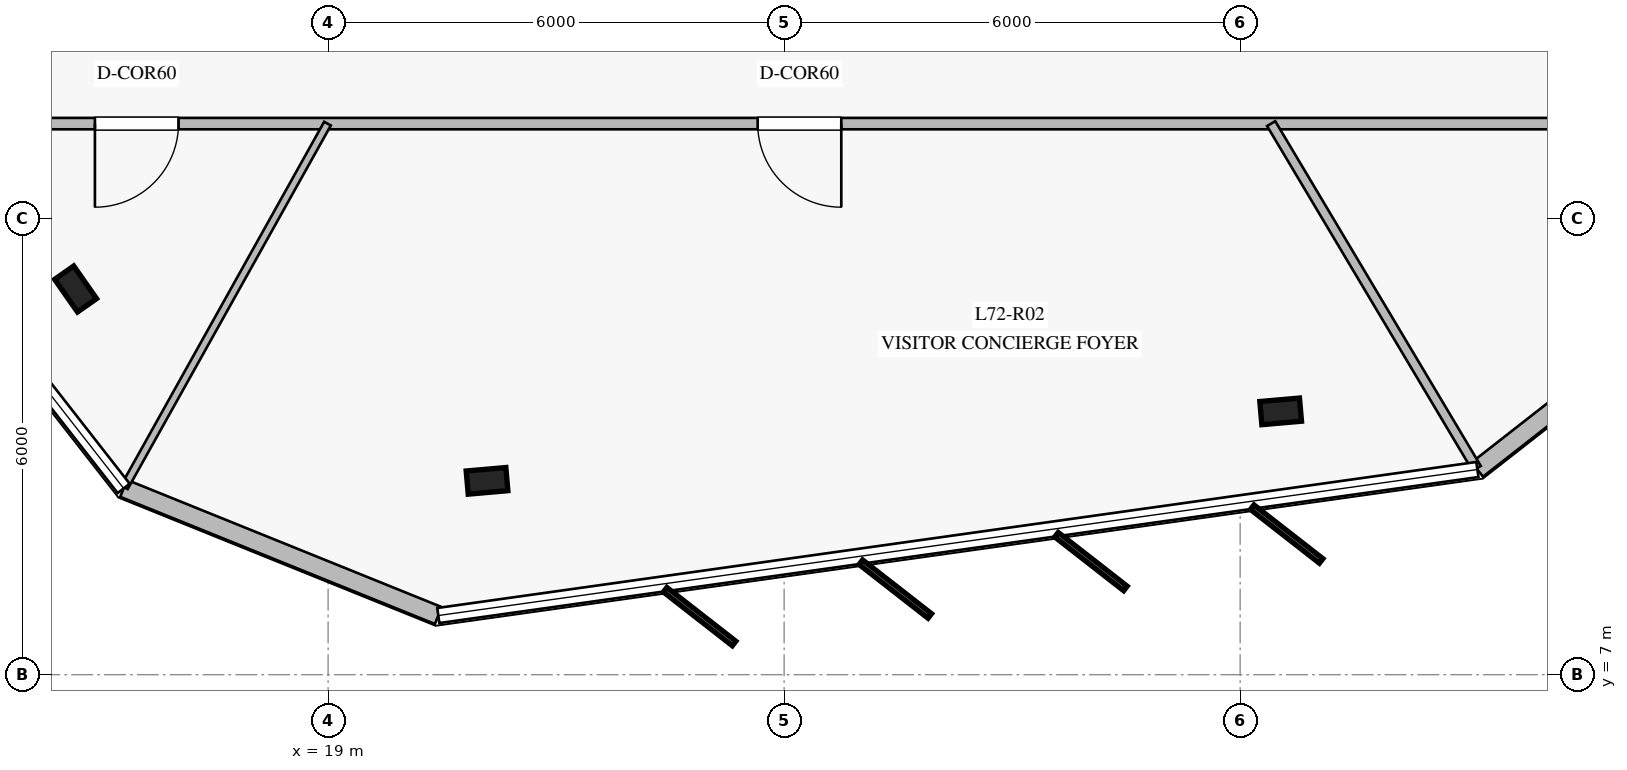
"""IFC4 building model, lengths in metres.
Left out: names, types, materials, properties, quantities, classifications, styles, units other than length and angle.
Written with IfcOpenShell. Run it as: python <this file> out.ifc"""

import sys

from ifc_helpers import new_model, si_unit, direction, frame, frame_2d, origin, origin_2d, place, context, subcontext, project, spatial, rectangle, i_section, extrude, element, fill, save


model = new_model("IFC4")
c1 = context("Model", 3, precision=1e-05, world=origin(), true_north=direction((0.0, 1.0)))
c2 = subcontext(c1, "Body", "Model", "MODEL_VIEW")
j1 = project(units=[si_unit("LENGTHUNIT", "METRE"), si_unit("PLANEANGLEUNIT", "RADIAN")], contexts=[c1])
p1 = place(None, origin())
s1 = spatial("IfcSite", under=j1, at=p1, CompositionType="ELEMENT")
p2 = place(p1, origin())
s2 = spatial("IfcBuilding", under=s1, at=p2, CompositionType="ELEMENT")
p3 = place(p2, frame((0.0, 0.0, 298.2)))
s3 = spatial("IfcBuildingStorey", under=s2, at=p3, CompositionType="ELEMENT", Elevation=298.2)
for number, where, z_axis, x_axis in (
    (1, (15.678, 12.074, 0.0), (0.0, 0.0, 1.0), (-0.574, 0.819, 0.0)),
    (2, (21.091, 9.55, 0.0), (0.0, 0.0, 1.0), (0.996, 0.087, 0.0)),
    (3, (31.533, 10.464, 0.0), (0.0, 0.0, 1.0), (0.996, 0.087, 0.0)),
):
    element("IfcColumn", number, at=place(p3, frame(where, z_axis=z_axis, x_axis=x_axis)), inside=s3, PredefinedType="COLUMN", context=c2, shape_type="SweptSolid", body=[
        extrude(i_section(OverallWidth=0.306, OverallDepth=0.524, WebThickness=0.021, FlangeThickness=0.04, at=origin_2d()), origin(), (0.0, 0.0, 1.0), 4.0),
    ])
p4 = place(p3, frame((16.31, 9.451, 0.0), z_axis=(0.0, 0.0, 1.0), x_axis=(0.927166243324, -0.374650179823, 0.0)))
e4 = element("IfcWall", 4, at=p4, inside=s3, PredefinedType="STANDARD", context=c2, shape_type="SweptSolid", body=[
    extrude(rectangle(XDim=4.465, YDim=0.24, at=frame_2d((2.232, 0.0))), origin(), (0.0, 0.0, 1.0), 3.78),
])
p5 = place(p3, frame((34.121, 9.699, 0.0), z_axis=(0.0, 0.0, 1.0), x_axis=(0.78792242083, 0.615774519408, 0.0)))
e5 = element("IfcWall", 5, at=p5, inside=s3, PredefinedType="STANDARD", context=c2, shape_type="SweptSolid", body=[
    extrude(rectangle(XDim=4.466, YDim=0.24, at=frame_2d((2.233, 0.0))), origin(), (0.0, 0.0, 1.0), 3.78),
])
p6 = place(p3, frame((36.35, 14.25, 0.0), z_axis=(0.0, 0.0, 1.0), x_axis=(-1.0, 0.0, 0.0)))
e6 = element("IfcWall", 6, at=p6, inside=s3, PredefinedType="PARTITIONING", context=c2, shape_type="SweptSolid", body=[
    extrude(rectangle(XDim=22.7, YDim=0.15, at=frame_2d((11.35, 0.0))), origin(), (0.0, 0.0, 1.0), 3.28),
])
p7 = place(p6, frame((19.318, 0.0, 0.0)))
e7 = element("IfcOpeningElement", 7, at=p7, cuts=e6, PredefinedType="OPENING", context=c2, shape_type="SweptSolid", body=[
    extrude(rectangle(XDim=1.1, YDim=2.2, at=frame_2d((0.55, 1.1))), frame((0.0, 0.085, 0.0), z_axis=(0.0, -1.0, 0.0), x_axis=(1.0, 0.0, 0.0)), (0.0, 0.0, 1.0), 0.17),
])
p8 = place(p6, frame((10.598, 0.0, 0.0)))
e8 = element("IfcOpeningElement", 8, at=p8, cuts=e6, PredefinedType="OPENING", context=c2, shape_type="SweptSolid", body=[
    extrude(rectangle(XDim=1.1, YDim=2.2, at=frame_2d((0.55, 1.1))), frame((0.0, 0.085, 0.0), z_axis=(0.0, -1.0, 0.0), x_axis=(1.0, 0.0, 0.0)), (0.0, 0.0, 1.0), 0.17),
])
p9 = place(p3, frame((18.992, 14.25, 0.0), z_axis=(0.0, 0.0, 1.0), x_axis=(-0.487748464392, -0.87298421262, 0.0)))
e9 = element("IfcWall", 9, at=p9, inside=s3, PredefinedType="MOVABLE", context=c2, shape_type="SweptSolid", body=[
    extrude(rectangle(XDim=5.48, YDim=0.1, at=frame_2d((2.74, 0.0))), origin(), (0.0, 0.0, 1.0), 3.28),
])
p10 = place(p3, frame((31.408, 14.25, 0.0), z_axis=(0.0, 0.0, 1.0), x_axis=(0.512066510175, -0.858945801059, 0.0)))
e10 = element("IfcWall", 10, at=p10, inside=s3, PredefinedType="PARTITIONING", context=c2, shape_type="SweptSolid", body=[
    extrude(rectangle(XDim=5.281, YDim=0.125, at=frame_2d((2.64, 0.0))), origin(), (0.0, 0.0, 1.0), 3.28),
])
p11 = place(p7, origin())
e11 = element("IfcDoor", 11, at=p11, inside=s3, OperationType="SINGLE_SWING_RIGHT", PredefinedType="DOOR", context=c2, shape_type="SweptSolid", body=[
    extrude(rectangle(XDim=1.1, YDim=2.2, at=frame_2d((0.55, 1.1))), frame((0.0, 0.025, 0.0), z_axis=(0.0, -1.0, 0.0), x_axis=(1.0, 0.0, 0.0)), (0.0, 0.0, 1.0), 0.05),
])
fill(e7, e11)
p12 = place(p8, origin())
e12 = element("IfcDoor", 12, at=p12, inside=s3, OperationType="SINGLE_SWING_LEFT", PredefinedType="DOOR", context=c2, shape_type="SweptSolid", body=[
    extrude(rectangle(XDim=1.1, YDim=2.2, at=frame_2d((0.55, 1.1))), frame((0.0, 0.025, 0.0), z_axis=(0.0, -1.0, 0.0), x_axis=(1.0, 0.0, 0.0)), (0.0, 0.0, 1.0), 0.05),
])
fill(e8, e12)
save(model, sys.argv[1])
